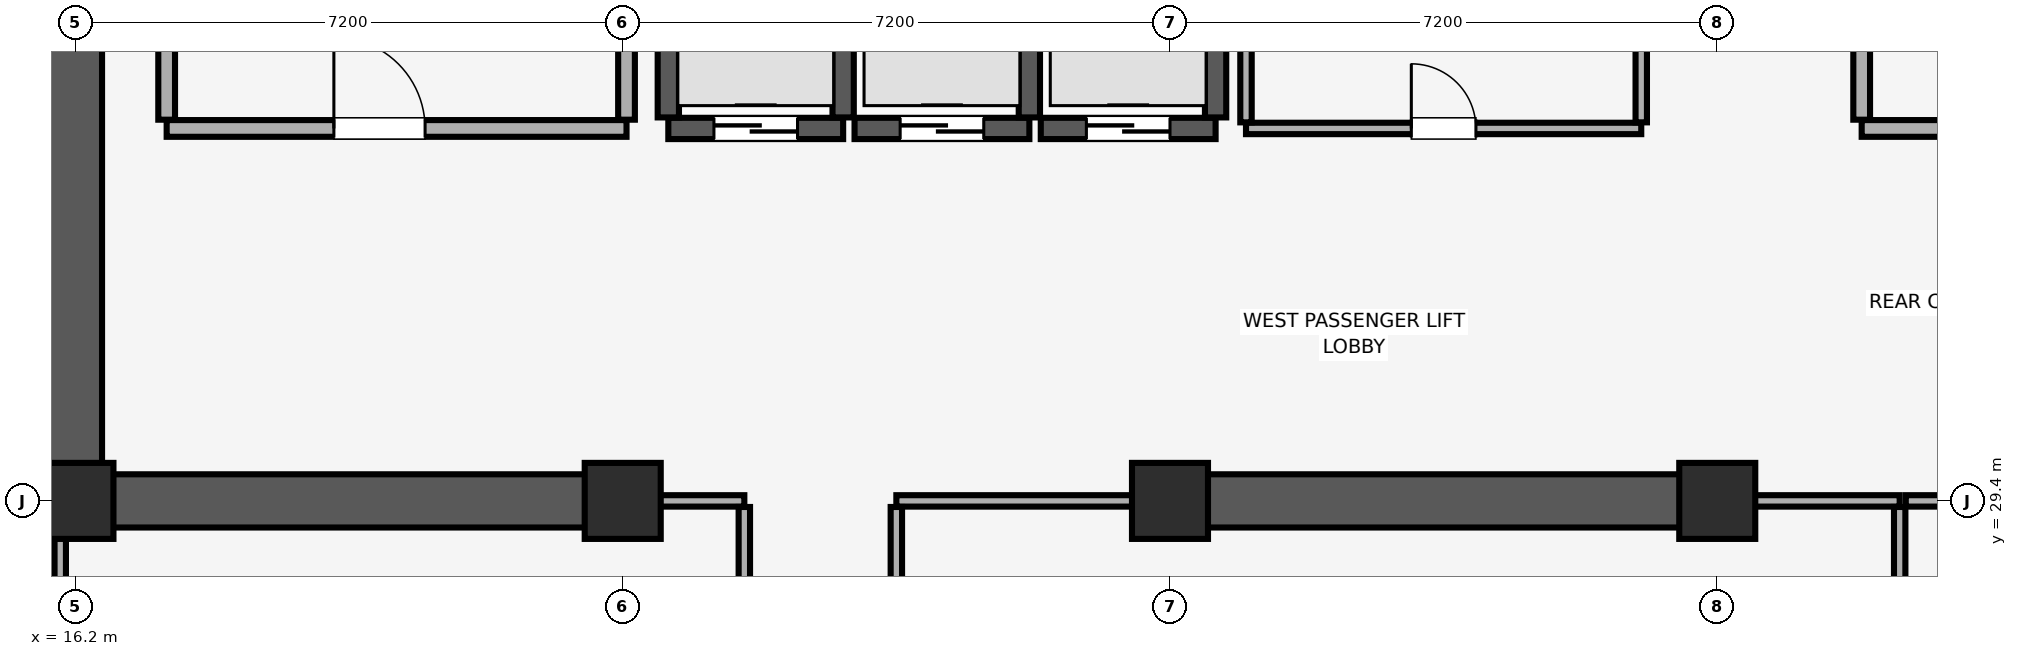
"""IFC4 building model, lengths in metres.
Left out: names, types, materials, properties, quantities, classifications, styles, units other than length and angle.
Written with IfcOpenShell. Run it as: python <this file> out.ifc"""

import sys

from ifc_helpers import new_model, si_unit, direction, frame, frame_2d, origin, origin_2d, place, context, subcontext, project, spatial, rectangle, extrude, element, fill, save


model = new_model("IFC4")
c1 = context("Model", 3, precision=1e-05, world=origin(), true_north=direction((0.0, 1.0)))
c2 = subcontext(c1, "Body", "Model", "MODEL_VIEW")
j1 = project(units=[si_unit("LENGTHUNIT", "METRE"), si_unit("PLANEANGLEUNIT", "RADIAN")], contexts=[c1])
p1 = place(None, origin())
s1 = spatial("IfcSite", under=j1, at=p1, CompositionType="ELEMENT")
p2 = place(p1, origin())
s2 = spatial("IfcBuilding", under=s1, at=p2, CompositionType="ELEMENT")
p3 = place(p2, frame((0.0, 0.0, 276.55)))
s3 = spatial("IfcBuildingStorey", under=s2, at=p3, CompositionType="ELEMENT", Elevation=276.55)
for number, where, z_axis, x_axis in (
    (1, (16.2, 29.4, 0.0), (0.0, 0.0, 1.0), (1.0, 0.0, 0.0)),
    (2, (23.4, 29.4, 0.0), (0.0, 0.0, 1.0), (1.0, 0.0, 0.0)),
    (3, (30.6, 29.4, 0.0), (0.0, 0.0, 1.0), (1.0, 0.0, 0.0)),
    (4, (37.8, 29.4, 0.0), (0.0, 0.0, 1.0), (1.0, 0.0, 0.0)),
):
    element("IfcColumn", number, at=place(p3, frame(where, z_axis=z_axis, x_axis=x_axis)), inside=s3, PredefinedType="COLUMN", context=c2, shape_type="SweptSolid", body=[
        extrude(rectangle(XDim=1.0, YDim=1.0, at=origin_2d()), origin(), (0.0, 0.0, 1.0), 3.6),
    ])
p4 = place(p3, frame((16.2, 29.4, 0.0), z_axis=(0.0, 0.0, 1.0), x_axis=(0.0, 1.0, 0.0)))
e5 = element("IfcWall", 5, at=p4, inside=s3, PredefinedType="SHEAR", context=c2, shape_type="SweptSolid", body=[
    extrude(rectangle(XDim=19.2, YDim=0.7, at=frame_2d((9.6, 0.0))), origin(), (0.0, 0.0, 1.0), 3.6),
])
p5 = place(p3, frame((16.555, 29.4, 0.0), z_axis=(0.0, 0.0, 1.0), x_axis=(1.0, 0.0, 0.0)))
e6 = element("IfcWall", 6, at=p5, inside=s3, PredefinedType="SHEAR", context=c2, shape_type="SweptSolid", body=[
    extrude(rectangle(XDim=7.045, YDim=0.7, at=frame_2d((3.522, 0.0))), origin(), (0.0, 0.0, 1.0), 3.6),
])
p6 = place(p3, frame((30.4, 29.4, 0.0), z_axis=(0.0, 0.0, 1.0), x_axis=(1.0, 0.0, 0.0)))
e7 = element("IfcWall", 7, at=p6, inside=s3, PredefinedType="SHEAR", context=c2, shape_type="SweptSolid", body=[
    extrude(rectangle(XDim=7.6, YDim=0.7, at=frame_2d((3.8, 0.0))), origin(), (0.0, 0.0, 1.0), 3.6),
])
p7 = place(p3, frame((24.0, 34.3, 0.0), z_axis=(0.0, 0.0, 1.0), x_axis=(1.0, 0.0, 0.0)))
e8 = element("IfcWall", 8, at=p7, inside=s3, PredefinedType="SHEAR", context=c2, shape_type="SweptSolid", body=[
    extrude(rectangle(XDim=2.3, YDim=0.28, at=frame_2d((1.15, 0.0))), origin(), (0.0, 0.0, 1.0), 3.6),
])
p8 = place(p7, frame((0.6, 0.0, 0.0)))
e9 = element("IfcOpeningElement", 9, at=p8, cuts=e8, PredefinedType="OPENING", context=c2, shape_type="SweptSolid", body=[
    extrude(rectangle(XDim=1.1, YDim=2.2, at=frame_2d((0.55, 1.1))), frame((0.0, 0.15, 0.0), z_axis=(0.0, -1.0, 0.0), x_axis=(1.0, 0.0, 0.0)), (0.0, 0.0, 1.0), 0.3),
])
for number, where, z_axis, x_axis in (
    (10, (24.0, 34.445, 0.0), (0.0, 0.0, 1.0), (0.0, 1.0, 0.0)),
    (11, (26.3, 34.445, 0.0), (0.0, 0.0, 1.0), (0.0, 1.0, 0.0)),
):
    element("IfcWall", number, at=place(p3, frame(where, z_axis=z_axis, x_axis=x_axis)), inside=s3, PredefinedType="SHEAR", context=c2, shape_type="SweptSolid", body=[
        extrude(rectangle(XDim=2.01, YDim=0.28, at=frame_2d((1.005, 0.0))), origin(), (0.0, 0.0, 1.0), 3.6),
    ])
p9 = place(p3, frame((26.45, 34.3, 0.0), z_axis=(0.0, 0.0, 1.0), x_axis=(1.0, 0.0, 0.0)))
e12 = element("IfcWall", 12, at=p9, inside=s3, PredefinedType="SHEAR", context=c2, shape_type="SweptSolid", body=[
    extrude(rectangle(XDim=2.3, YDim=0.28, at=frame_2d((1.15, 0.0))), origin(), (0.0, 0.0, 1.0), 3.6),
])
p10 = place(p9, frame((0.6, 0.0, 0.0)))
e13 = element("IfcOpeningElement", 13, at=p10, cuts=e12, PredefinedType="OPENING", context=c2, shape_type="SweptSolid", body=[
    extrude(rectangle(XDim=1.1, YDim=2.2, at=frame_2d((0.55, 1.1))), frame((0.0, 0.15, 0.0), z_axis=(0.0, -1.0, 0.0), x_axis=(1.0, 0.0, 0.0)), (0.0, 0.0, 1.0), 0.3),
])
p11 = place(p3, frame((28.75, 34.445, 0.0), z_axis=(0.0, 0.0, 1.0), x_axis=(0.0, 1.0, 0.0)))
e14 = element("IfcWall", 14, at=p11, inside=s3, PredefinedType="SHEAR", context=c2, shape_type="SweptSolid", body=[
    extrude(rectangle(XDim=2.01, YDim=0.28, at=frame_2d((1.005, 0.0))), origin(), (0.0, 0.0, 1.0), 3.6),
])
p12 = place(p3, frame((28.9, 34.3, 0.0), z_axis=(0.0, 0.0, 1.0), x_axis=(1.0, 0.0, 0.0)))
e15 = element("IfcWall", 15, at=p12, inside=s3, PredefinedType="SHEAR", context=c2, shape_type="SweptSolid", body=[
    extrude(rectangle(XDim=2.3, YDim=0.28, at=frame_2d((1.15, 0.0))), origin(), (0.0, 0.0, 1.0), 3.6),
])
p13 = place(p12, frame((0.6, 0.0, 0.0)))
e16 = element("IfcOpeningElement", 16, at=p13, cuts=e15, PredefinedType="OPENING", context=c2, shape_type="SweptSolid", body=[
    extrude(rectangle(XDim=1.1, YDim=2.2, at=frame_2d((0.55, 1.1))), frame((0.0, 0.15, 0.0), z_axis=(0.0, -1.0, 0.0), x_axis=(1.0, 0.0, 0.0)), (0.0, 0.0, 1.0), 0.3),
])
p14 = place(p3, frame((31.2, 34.445, 0.0), z_axis=(0.0, 0.0, 1.0), x_axis=(0.0, 1.0, 0.0)))
e17 = element("IfcWall", 17, at=p14, inside=s3, PredefinedType="SHEAR", context=c2, shape_type="SweptSolid", body=[
    extrude(rectangle(XDim=2.01, YDim=0.28, at=frame_2d((1.005, 0.0))), origin(), (0.0, 0.0, 1.0), 3.6),
])
p15 = place(p3, frame((17.4, 34.3, 0.0), z_axis=(0.0, 0.0, 1.0), x_axis=(1.0, 0.0, 0.0)))
e18 = element("IfcWall", 18, at=p15, inside=s3, PredefinedType="PARTITIONING", context=c2, shape_type="SweptSolid", body=[
    extrude(rectangle(XDim=6.05, YDim=0.22, at=frame_2d((3.025, 0.0))), origin(), (0.0, 0.0, 1.0), 3.6),
])
p16 = place(p15, frame((2.2, 0.0, 0.0)))
e19 = element("IfcOpeningElement", 19, at=p16, cuts=e18, PredefinedType="OPENING", context=c2, shape_type="SweptSolid", body=[
    extrude(rectangle(XDim=1.2, YDim=2.15, at=frame_2d((0.6, 1.075))), frame((0.0, 0.12, 0.0), z_axis=(0.0, -1.0, 0.0), x_axis=(1.0, 0.0, 0.0)), (0.0, 0.0, 1.0), 0.24),
])
p17 = place(p3, frame((17.4, 34.415, 0.0), z_axis=(0.0, 0.0, 1.0), x_axis=(0.0, 1.0, 0.0)))
e20 = element("IfcWall", 20, at=p17, inside=s3, PredefinedType="PARTITIONING", context=c2, shape_type="SweptSolid", body=[
    extrude(rectangle(XDim=5.43, YDim=0.22, at=frame_2d((2.715, 0.0))), origin(), (0.0, 0.0, 1.0), 3.6),
])
p18 = place(p3, frame((23.45, 34.415, 0.0), z_axis=(0.0, 0.0, 1.0), x_axis=(0.0, 1.0, 0.0)))
e21 = element("IfcWall", 21, at=p18, inside=s3, PredefinedType="PARTITIONING", context=c2, shape_type="SweptSolid", body=[
    extrude(rectangle(XDim=5.64, YDim=0.22, at=frame_2d((2.82, 0.0))), origin(), (0.0, 0.0, 1.0), 3.6),
])
p19 = place(p3, frame((39.7, 34.3, 0.0), z_axis=(0.0, 0.0, 1.0), x_axis=(1.0, 0.0, 0.0)))
e22 = element("IfcWall", 22, at=p19, inside=s3, PredefinedType="PARTITIONING", context=c2, shape_type="SweptSolid", body=[
    extrude(rectangle(XDim=4.6, YDim=0.22, at=frame_2d((2.3, 0.0))), origin(), (0.0, 0.0, 1.0), 3.6),
])
p20 = place(p19, frame((1.7, 0.0, 0.0)))
e23 = element("IfcOpeningElement", 23, at=p20, cuts=e22, PredefinedType="OPENING", context=c2, shape_type="SweptSolid", body=[
    extrude(rectangle(XDim=1.2, YDim=2.15, at=frame_2d((0.6, 1.075))), frame((0.0, 0.12, 0.0), z_axis=(0.0, -1.0, 0.0), x_axis=(1.0, 0.0, 0.0)), (0.0, 0.0, 1.0), 0.24),
])
p21 = place(p3, frame((39.7, 34.415, 0.0), z_axis=(0.0, 0.0, 1.0), x_axis=(0.0, 1.0, 0.0)))
e24 = element("IfcWall", 24, at=p21, inside=s3, PredefinedType="PARTITIONING", context=c2, shape_type="SweptSolid", body=[
    extrude(rectangle(XDim=5.785, YDim=0.22, at=frame_2d((2.893, 0.0))), origin(), (0.0, 0.0, 1.0), 3.6),
])
p22 = place(p3, frame((31.6, 34.3, 0.0), z_axis=(0.0, 0.0, 1.0), x_axis=(1.0, 0.0, 0.0)))
e25 = element("IfcWall", 25, at=p22, inside=s3, PredefinedType="PARTITIONING", context=c2, shape_type="SweptSolid", body=[
    extrude(rectangle(XDim=5.2, YDim=0.15, at=frame_2d((2.6, 0.0))), origin(), (0.0, 0.0, 1.0), 3.6),
])
p23 = place(p22, frame((2.175, 0.0, 0.0)))
e26 = element("IfcOpeningElement", 26, at=p23, cuts=e25, PredefinedType="OPENING", context=c2, shape_type="SweptSolid", body=[
    extrude(rectangle(XDim=0.85, YDim=2.1, at=frame_2d((0.425, 1.05))), frame((0.0, 0.085, 0.0), z_axis=(0.0, -1.0, 0.0), x_axis=(1.0, 0.0, 0.0)), (0.0, 0.0, 1.0), 0.17),
])
for number, where, z_axis, x_axis in (
    (27, (31.6, 34.38, 0.0), (0.0, 0.0, 1.0), (0.0, 1.0, 0.0)),
    (28, (36.8, 34.38, 0.0), (0.0, 0.0, 1.0), (0.0, 1.0, 0.0)),
):
    element("IfcWall", number, at=place(p3, frame(where, z_axis=z_axis, x_axis=x_axis)), inside=s3, PredefinedType="PARTITIONING", context=c2, shape_type="SweptSolid", body=[
        extrude(rectangle(XDim=4.94, YDim=0.15, at=frame_2d((2.47, 0.0))), origin(), (0.0, 0.0, 1.0), 3.6),
    ])
p24 = place(p3, frame((23.61, 29.4, 0.0), z_axis=(0.0, 0.0, 1.0), x_axis=(1.0, 0.0, 0.0)))
e29 = element("IfcWall", 29, at=p24, inside=s3, PredefinedType="PARTITIONING", context=c2, shape_type="SweptSolid", body=[
    extrude(rectangle(XDim=1.39, YDim=0.15, at=frame_2d((0.695, 0.0))), origin(), (0.0, 0.0, 1.0), 2.5),
])
p25 = place(p3, frame((16.0, 25.08, 0.0), z_axis=(0.0, 0.0, 1.0), x_axis=(0.0, 1.0, 0.0)))
e30 = element("IfcWall", 30, at=p25, inside=s3, PredefinedType="PARTITIONING", context=c2, shape_type="SweptSolid", body=[
    extrude(rectangle(XDim=4.31, YDim=0.15, at=frame_2d((2.155, 0.0))), origin(), (0.0, 0.0, 1.0), 3.1),
])
p26 = place(p3, frame((25.0, 25.08, 0.0), z_axis=(0.0, 0.0, 1.0), x_axis=(0.0, 1.0, 0.0)))
e31 = element("IfcWall", 31, at=p26, inside=s3, PredefinedType="PARTITIONING", context=c2, shape_type="SweptSolid", body=[
    extrude(rectangle(XDim=4.24, YDim=0.15, at=frame_2d((2.12, 0.0))), origin(), (0.0, 0.0, 1.0), 3.6),
])
p27 = place(p3, frame((27.0, 29.4, 0.0), z_axis=(0.0, 0.0, 1.0), x_axis=(1.0, 0.0, 0.0)))
e32 = element("IfcWall", 32, at=p27, inside=s3, PredefinedType="PARTITIONING", context=c2, shape_type="SweptSolid", body=[
    extrude(rectangle(XDim=3.39, YDim=0.15, at=frame_2d((1.695, 0.0))), origin(), (0.0, 0.0, 1.0), 2.5),
])
p28 = place(p3, frame((38.01, 29.4, 0.0), z_axis=(0.0, 0.0, 1.0), x_axis=(1.0, 0.0, 0.0)))
e33 = element("IfcWall", 33, at=p28, inside=s3, PredefinedType="PARTITIONING", context=c2, shape_type="SweptSolid", body=[
    extrude(rectangle(XDim=2.19, YDim=0.15, at=frame_2d((1.095, 0.0))), origin(), (0.0, 0.0, 1.0), 2.5),
])
p29 = place(p3, frame((27.0, 25.08, 0.0), z_axis=(0.0, 0.0, 1.0), x_axis=(0.0, 1.0, 0.0)))
e34 = element("IfcWall", 34, at=p29, inside=s3, PredefinedType="PARTITIONING", context=c2, shape_type="SweptSolid", body=[
    extrude(rectangle(XDim=4.24, YDim=0.15, at=frame_2d((2.12, 0.0))), origin(), (0.0, 0.0, 1.0), 3.1),
])
p30 = place(p3, frame((40.2, 25.08, 0.0), z_axis=(0.0, 0.0, 1.0), x_axis=(0.0, 1.0, 0.0)))
e35 = element("IfcWall", 35, at=p30, inside=s3, PredefinedType="PARTITIONING", context=c2, shape_type="SweptSolid", body=[
    extrude(rectangle(XDim=4.24, YDim=0.15, at=frame_2d((2.12, 0.0))), origin(), (0.0, 0.0, 1.0), 3.6),
])
p31 = place(p3, frame((40.28, 29.4, 0.0), z_axis=(0.0, 0.0, 1.0), x_axis=(1.0, 0.0, 0.0)))
e36 = element("IfcWall", 36, at=p31, inside=s3, PredefinedType="PARTITIONING", context=c2, shape_type="SweptSolid", body=[
    extrude(rectangle(XDim=5.71, YDim=0.15, at=frame_2d((2.855, 0.0))), origin(), (0.0, 0.0, 1.0), 2.5),
])
p32 = place(p8, origin())
e37 = element("IfcDoor", 37, at=p32, inside=s3, OperationType="DOUBLE_DOOR_SLIDING", PredefinedType="DOOR", context=c2, shape_type="SweptSolid", body=[
    extrude(rectangle(XDim=1.1, YDim=2.2, at=frame_2d((0.55, 1.1))), frame((0.0, 0.025, 0.0), z_axis=(0.0, -1.0, 0.0), x_axis=(1.0, 0.0, 0.0)), (0.0, 0.0, 1.0), 0.05),
])
fill(e9, e37)
p33 = place(p10, origin())
e38 = element("IfcDoor", 38, at=p33, inside=s3, OperationType="DOUBLE_DOOR_SLIDING", PredefinedType="DOOR", context=c2, shape_type="SweptSolid", body=[
    extrude(rectangle(XDim=1.1, YDim=2.2, at=frame_2d((0.55, 1.1))), frame((0.0, 0.025, 0.0), z_axis=(0.0, -1.0, 0.0), x_axis=(1.0, 0.0, 0.0)), (0.0, 0.0, 1.0), 0.05),
])
fill(e13, e38)
p34 = place(p13, origin())
e39 = element("IfcDoor", 39, at=p34, inside=s3, OperationType="DOUBLE_DOOR_SLIDING", PredefinedType="DOOR", context=c2, shape_type="SweptSolid", body=[
    extrude(rectangle(XDim=1.1, YDim=2.2, at=frame_2d((0.55, 1.1))), frame((0.0, 0.025, 0.0), z_axis=(0.0, -1.0, 0.0), x_axis=(1.0, 0.0, 0.0)), (0.0, 0.0, 1.0), 0.05),
])
fill(e16, e39)
p35 = place(p16, origin())
e40 = element("IfcDoor", 40, at=p35, inside=s3, OperationType="SINGLE_SWING_LEFT", PredefinedType="DOOR", context=c2, shape_type="SweptSolid", body=[
    extrude(rectangle(XDim=1.2, YDim=2.15, at=frame_2d((0.6, 1.075))), frame((0.0, 0.025, 0.0), z_axis=(0.0, -1.0, 0.0), x_axis=(1.0, 0.0, 0.0)), (0.0, 0.0, 1.0), 0.05),
])
fill(e19, e40)
p36 = place(p23, origin())
e41 = element("IfcDoor", 41, at=p36, inside=s3, OperationType="SINGLE_SWING_LEFT", PredefinedType="DOOR", context=c2, shape_type="SweptSolid", body=[
    extrude(rectangle(XDim=0.85, YDim=2.1, at=frame_2d((0.425, 1.05))), frame((0.0, 0.025, 0.0), z_axis=(0.0, -1.0, 0.0), x_axis=(1.0, 0.0, 0.0)), (0.0, 0.0, 1.0), 0.05),
])
fill(e26, e41)
save(model, sys.argv[1])
